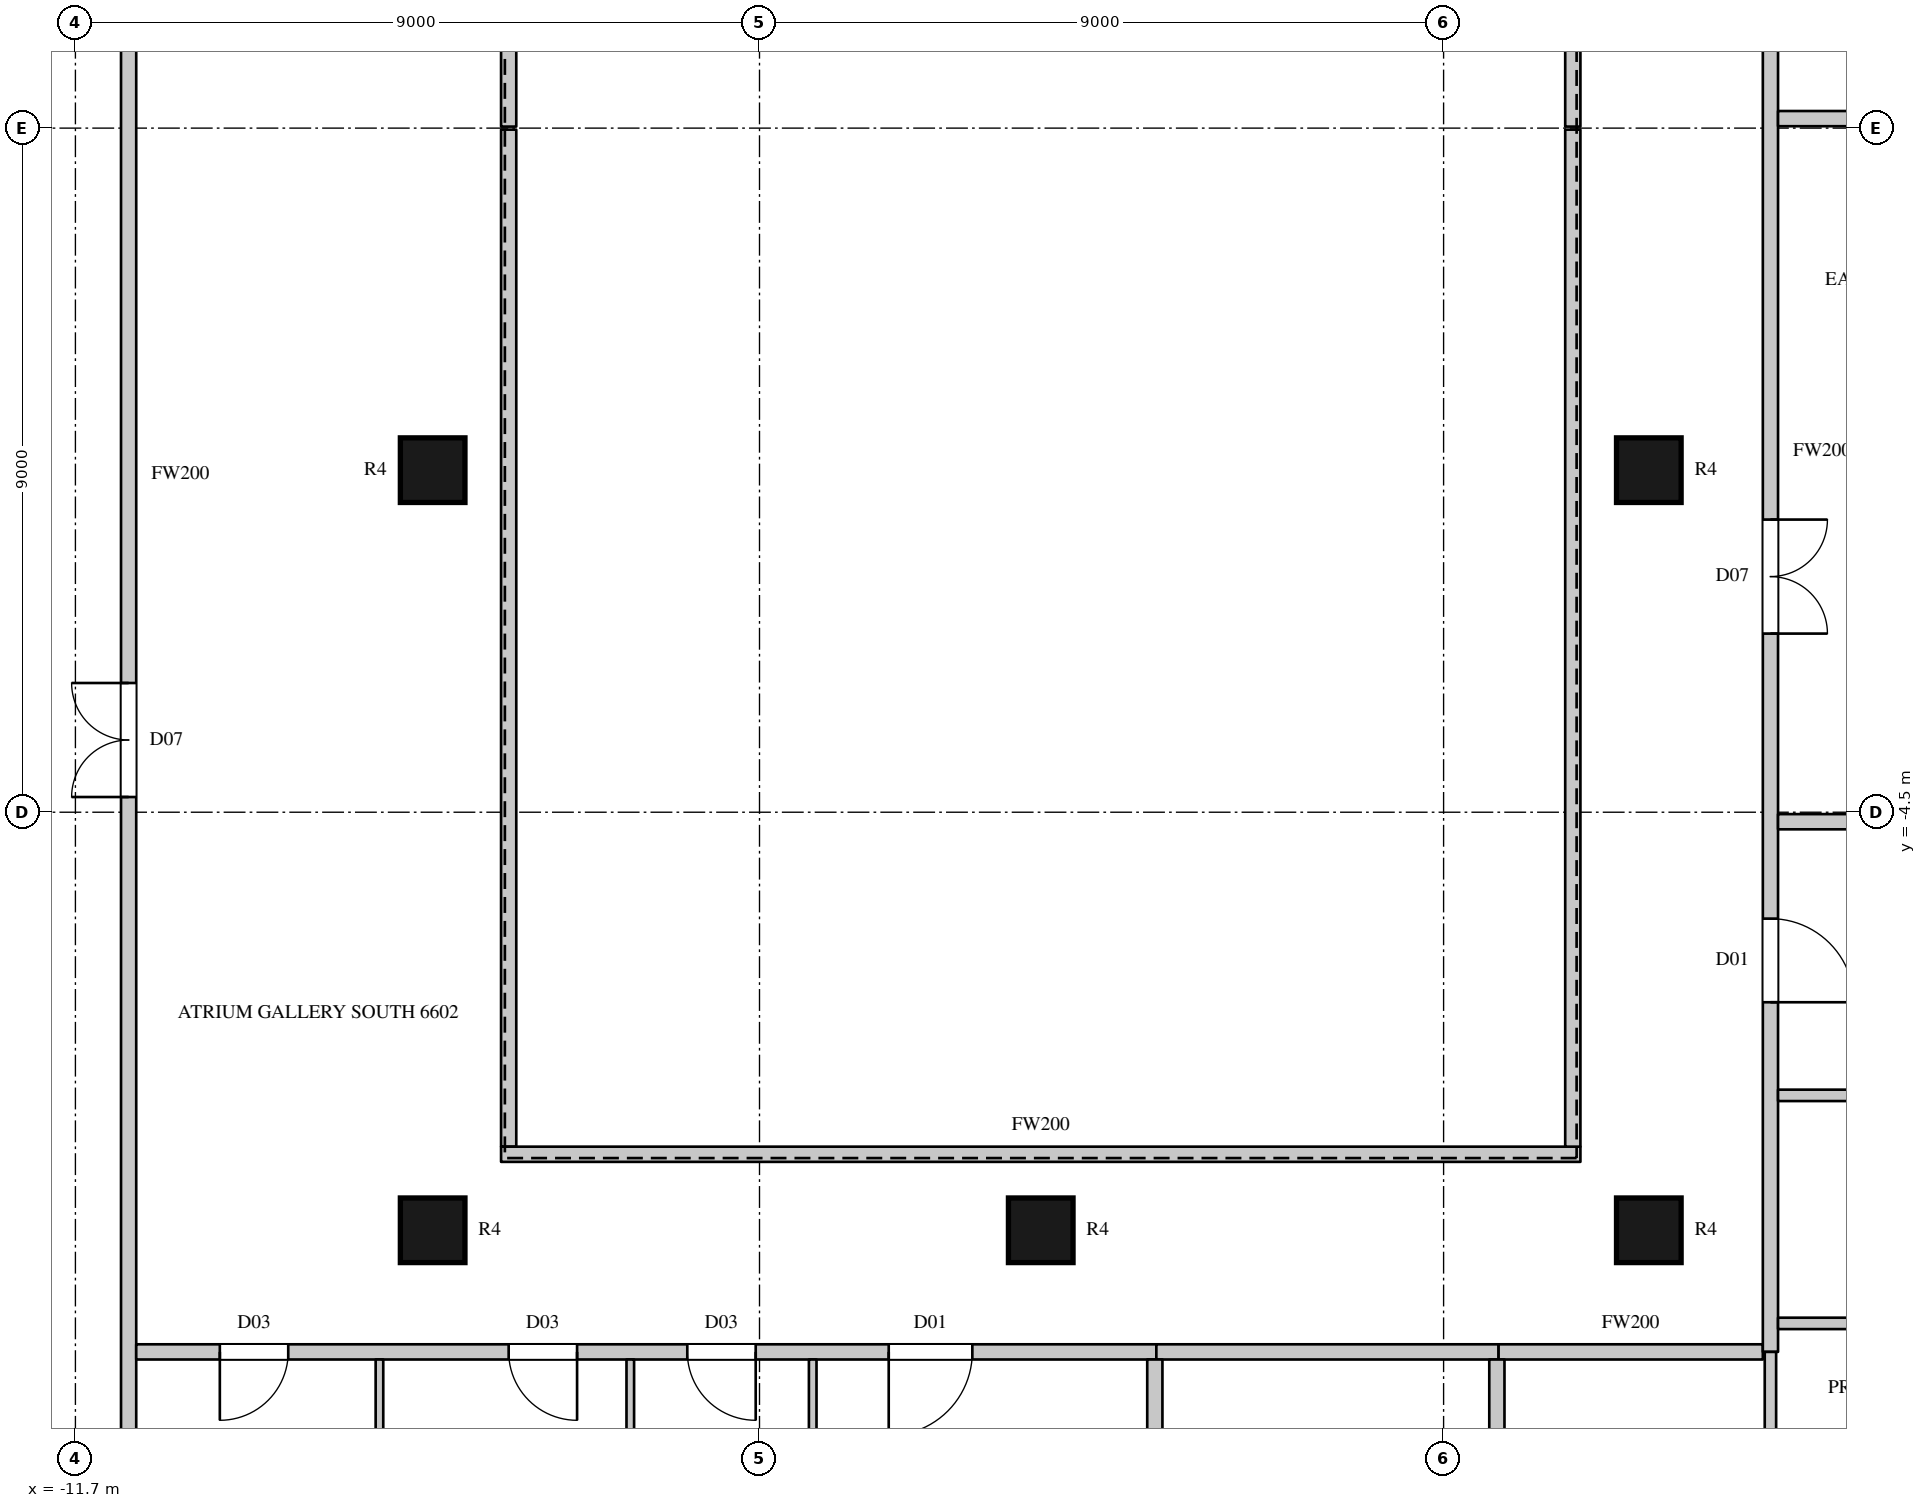
"""IFC4 building model, lengths in metres.
Left out: names, types, materials, properties, quantities, classifications, styles, units other than length and angle.
Written with IfcOpenShell. Run it as: python <this file> out.ifc"""

import sys

from ifc_helpers import new_model, si_unit, direction, frame, frame_2d, origin, origin_2d, place, context, subcontext, project, spatial, rectangle, circle, extrude, element, fill, save


model = new_model("IFC4")
c1 = context("Model", 3, precision=1e-05, world=origin(), true_north=direction((0.0, 1.0)))
c2 = subcontext(c1, "Body", "Model", "MODEL_VIEW")
j1 = project(units=[si_unit("LENGTHUNIT", "METRE"), si_unit("PLANEANGLEUNIT", "RADIAN")], contexts=[c1])
p1 = place(None, origin())
s1 = spatial("IfcSite", under=j1, at=p1, CompositionType="ELEMENT")
p2 = place(p1, origin())
s2 = spatial("IfcBuilding", under=s1, at=p2, CompositionType="ELEMENT")
p3 = place(p2, frame((0.0, 0.0, 292.6)))
s3 = spatial("IfcBuildingStorey", under=s2, at=p3, CompositionType="ELEMENT", Elevation=292.6)
for number, where, z_axis, x_axis in (
    (1, (-7.0, -10.0, 0.0), (0.0, 0.0, 1.0), (1.0, 0.0, 0.0)),
    (2, (-7.0, 0.0, 0.0), (0.0, 0.0, 1.0), (1.0, 0.0, 0.0)),
    (3, (1.0, -10.0, 0.0), (0.0, 0.0, 1.0), (1.0, 0.0, 0.0)),
    (4, (9.0, -10.0, 0.0), (0.0, 0.0, 1.0), (1.0, 0.0, 0.0)),
    (5, (9.0, 0.0, 0.0), (0.0, 0.0, 1.0), (1.0, 0.0, 0.0)),
):
    element("IfcColumn", number, at=place(p3, frame(where, z_axis=z_axis, x_axis=x_axis)), inside=s3, PredefinedType="COLUMN", context=c2, shape_type="SweptSolid", body=[
        extrude(circle(Radius=0.425, at=origin_2d()), origin(), (0.0, 0.0, 1.0), 4.1),
    ])
p4 = place(p3, frame((-11.0, -14.8, 0.0), z_axis=(0.0, 0.0, 1.0), x_axis=(0.0, 1.0, 0.0)))
e6 = element("IfcWall", 6, at=p4, inside=s3, PredefinedType="PARTITIONING", context=c2, shape_type="SweptSolid", body=[
    extrude(rectangle(XDim=29.5, YDim=0.2, at=frame_2d((14.75, 0.0))), origin(), (0.0, 0.0, 1.0), 3.8),
])
p5 = place(p4, frame((10.5, 0.0, 0.0)))
e7 = element("IfcOpeningElement", 7, at=p5, cuts=e6, PredefinedType="OPENING", context=c2, shape_type="SweptSolid", body=[
    extrude(rectangle(XDim=1.5, YDim=2.4, at=frame_2d((0.75, 1.2))), frame((0.0, 0.11, 0.0), z_axis=(0.0, -1.0, 0.0), x_axis=(1.0, 0.0, 0.0)), (0.0, 0.0, 1.0), 0.22),
])
p6 = place(p3, frame((-10.9, -11.6, 0.0), z_axis=(0.0, 0.0, 1.0), x_axis=(1.0, 0.0, 0.0)))
e8 = element("IfcWall", 8, at=p6, inside=s3, PredefinedType="PARTITIONING", context=c2, shape_type="SweptSolid", body=[
    extrude(rectangle(XDim=13.421, YDim=0.2, at=frame_2d((6.71, 0.0))), origin(), (0.0, 0.0, 1.0), 3.8),
])
p7 = place(p6, frame((1.1, 0.0, 0.0)))
e9 = element("IfcOpeningElement", 9, at=p7, cuts=e8, PredefinedType="OPENING", context=c2, shape_type="SweptSolid", body=[
    extrude(rectangle(XDim=0.9, YDim=2.2, at=frame_2d((0.45, 1.1))), frame((0.0, 0.11, 0.0), z_axis=(0.0, -1.0, 0.0), x_axis=(1.0, 0.0, 0.0)), (0.0, 0.0, 1.0), 0.22),
])
p8 = place(p6, frame((4.9, 0.0, 0.0)))
e10 = element("IfcOpeningElement", 10, at=p8, cuts=e8, PredefinedType="OPENING", context=c2, shape_type="SweptSolid", body=[
    extrude(rectangle(XDim=0.9, YDim=2.2, at=frame_2d((0.45, 1.1))), frame((0.0, 0.11, 0.0), z_axis=(0.0, -1.0, 0.0), x_axis=(1.0, 0.0, 0.0)), (0.0, 0.0, 1.0), 0.22),
])
p9 = place(p6, frame((7.25, 0.0, 0.0)))
e11 = element("IfcOpeningElement", 11, at=p9, cuts=e8, PredefinedType="OPENING", context=c2, shape_type="SweptSolid", body=[
    extrude(rectangle(XDim=0.9, YDim=2.2, at=frame_2d((0.45, 1.1))), frame((0.0, 0.11, 0.0), z_axis=(0.0, -1.0, 0.0), x_axis=(1.0, 0.0, 0.0)), (0.0, 0.0, 1.0), 0.22),
])
p10 = place(p6, frame((9.9, 0.0, 0.0)))
e12 = element("IfcOpeningElement", 12, at=p10, cuts=e8, PredefinedType="OPENING", context=c2, shape_type="SweptSolid", body=[
    extrude(rectangle(XDim=1.1, YDim=2.4, at=frame_2d((0.55, 1.2))), frame((0.0, 0.11, 0.0), z_axis=(0.0, -1.0, 0.0), x_axis=(1.0, 0.0, 0.0)), (0.0, 0.0, 1.0), 0.22),
])
p11 = place(p3, frame((-6.0, -8.9, 0.0), z_axis=(0.0, 0.0, 1.0), x_axis=(0.0, 1.0, 0.0)))
e13 = element("IfcWall", 13, at=p11, inside=s3, PredefinedType="PARTITIONING", context=c2, shape_type="SweptSolid", body=[
    extrude(rectangle(XDim=13.38, YDim=0.2, at=frame_2d((6.69, 0.0))), origin(), (0.0, 0.0, 1.0), 3.8),
])
p12 = place(p3, frame((-6.1, -9.0, 0.0), z_axis=(0.0, 0.0, 1.0), x_axis=(1.0, 0.0, 0.0)))
e14 = element("IfcWall", 14, at=p12, inside=s3, PredefinedType="PARTITIONING", context=c2, shape_type="SweptSolid", body=[
    extrude(rectangle(XDim=14.2, YDim=0.2, at=frame_2d((7.1, 0.0))), origin(), (0.0, 0.0, 1.0), 3.8),
])
p13 = place(p3, frame((-6.0, 4.52, 0.0), z_axis=(0.0, 0.0, 1.0), x_axis=(0.0, 1.0, 0.0)))
e15 = element("IfcWall", 15, at=p13, inside=s3, PredefinedType="PARTITIONING", context=c2, shape_type="SweptSolid", body=[
    extrude(rectangle(XDim=4.38, YDim=0.2, at=frame_2d((2.19, 0.0))), origin(), (0.0, 0.0, 1.0), 3.8),
])
p14 = place(p3, frame((7.021, -11.6, 0.0), z_axis=(0.0, 0.0, 1.0), x_axis=(1.0, 0.0, 0.0)))
e16 = element("IfcWall", 16, at=p14, inside=s3, PredefinedType="PARTITIONING", context=c2, shape_type="SweptSolid", body=[
    extrude(rectangle(XDim=3.479, YDim=0.2, at=frame_2d((1.74, 0.0))), origin(), (0.0, 0.0, 1.0), 3.8),
])
p15 = place(p3, frame((8.0, -8.9, 0.0), z_axis=(0.0, 0.0, 1.0), x_axis=(0.0, 1.0, 0.0)))
e17 = element("IfcWall", 17, at=p15, inside=s3, PredefinedType="PARTITIONING", context=c2, shape_type="SweptSolid", body=[
    extrude(rectangle(XDim=13.38, YDim=0.2, at=frame_2d((6.69, 0.0))), origin(), (0.0, 0.0, 1.0), 3.8),
])
p16 = place(p3, frame((8.0, 4.52, 0.0), z_axis=(0.0, 0.0, 1.0), x_axis=(0.0, 1.0, 0.0)))
e18 = element("IfcWall", 18, at=p16, inside=s3, PredefinedType="PARTITIONING", context=c2, shape_type="SweptSolid", body=[
    extrude(rectangle(XDim=4.38, YDim=0.2, at=frame_2d((2.19, 0.0))), origin(), (0.0, 0.0, 1.0), 3.8),
])
p17 = place(p3, frame((10.6, -11.6, 0.0), z_axis=(0.0, 0.0, 1.0), x_axis=(0.0, 1.0, 0.0)))
e19 = element("IfcWall", 19, at=p17, inside=s3, PredefinedType="PARTITIONING", context=c2, shape_type="SweptSolid", body=[
    extrude(rectangle(XDim=23.7, YDim=0.2, at=frame_2d((11.85, 0.0))), origin(), (0.0, 0.0, 1.0), 3.8),
])
p18 = place(p17, frame((9.45, 0.0, 0.0)))
e20 = element("IfcOpeningElement", 20, at=p18, cuts=e19, PredefinedType="OPENING", context=c2, shape_type="SweptSolid", body=[
    extrude(rectangle(XDim=1.5, YDim=2.4, at=frame_2d((0.75, 1.2))), frame((0.0, 0.11, 0.0), z_axis=(0.0, -1.0, 0.0), x_axis=(1.0, 0.0, 0.0)), (0.0, 0.0, 1.0), 0.22),
])
p19 = place(p17, frame((19.45, 0.0, 0.0)))
e21 = element("IfcOpeningElement", 21, at=p19, cuts=e19, PredefinedType="OPENING", context=c2, shape_type="SweptSolid", body=[
    extrude(rectangle(XDim=1.1, YDim=2.4, at=frame_2d((0.55, 1.2))), frame((0.0, 0.11, 0.0), z_axis=(0.0, -1.0, 0.0), x_axis=(1.0, 0.0, 0.0)), (0.0, 0.0, 1.0), 0.22),
])
p20 = place(p17, frame((4.6, 0.0, 0.0)))
e22 = element("IfcOpeningElement", 22, at=p20, cuts=e19, PredefinedType="OPENING", context=c2, shape_type="SweptSolid", body=[
    extrude(rectangle(XDim=1.1, YDim=2.4, at=frame_2d((0.55, 1.2))), frame((0.0, 0.11, 0.0), z_axis=(0.0, -1.0, 0.0), x_axis=(1.0, 0.0, 0.0)), (0.0, 0.0, 1.0), 0.22),
])
for number, where, z_axis, x_axis in (
    (23, (10.7, -4.625, 0.0), (0.0, 0.0, 1.0), (1.0, 0.0, 0.0)),
    (24, (10.7, 4.625, 0.0), (0.0, 0.0, 1.0), (1.0, 0.0, 0.0)),
):
    element("IfcWall", number, at=place(p3, frame(where, z_axis=z_axis, x_axis=x_axis)), inside=s3, PredefinedType="PARTITIONING", context=c2, shape_type="SweptSolid", body=[
        extrude(rectangle(XDim=3.975, YDim=0.2, at=frame_2d((1.988, 0.0))), origin(), (0.0, 0.0, 1.0), 3.8),
    ])
p21 = place(p3, frame((10.6, -20.864, 0.0), z_axis=(0.0, 0.0, 1.0), x_axis=(0.0, 1.0, 0.0)))
e25 = element("IfcWall", 25, at=p21, inside=s3, PredefinedType="PARTITIONING", context=c2, shape_type="SweptSolid", body=[
    extrude(rectangle(XDim=9.264, YDim=0.15, at=frame_2d((4.632, 0.0))), origin(), (0.0, 0.0, 1.0), 3.8),
])
p22 = place(p3, frame((10.7, -11.225, 0.0), z_axis=(0.0, 0.0, 1.0), x_axis=(1.0, 0.0, 0.0)))
e26 = element("IfcWall", 26, at=p22, inside=s3, PredefinedType="PARTITIONING", context=c2, shape_type="SweptSolid", body=[
    extrude(rectangle(XDim=3.425, YDim=0.15, at=frame_2d((1.712, 0.0))), origin(), (0.0, 0.0, 1.0), 3.8),
])
p23 = place(p3, frame((10.7, -8.225, 0.0), z_axis=(0.0, 0.0, 1.0), x_axis=(1.0, 0.0, 0.0)))
e27 = element("IfcWall", 27, at=p23, inside=s3, PredefinedType="PARTITIONING", context=c2, shape_type="SweptSolid", body=[
    extrude(rectangle(XDim=3.575, YDim=0.15, at=frame_2d((1.788, 0.0))), origin(), (0.0, 0.0, 1.0), 3.15),
])
p24 = place(p23, frame((1.25, 0.0, 0.0)))
e28 = element("IfcOpeningElement", 28, at=p24, cuts=e27, PredefinedType="OPENING", context=c2, shape_type="SweptSolid", body=[
    extrude(rectangle(XDim=0.95, YDim=2.2, at=frame_2d((0.475, 1.1))), frame((0.0, 0.085, 0.0), z_axis=(0.0, -1.0, 0.0), x_axis=(1.0, 0.0, 0.0)), (0.0, 0.0, 1.0), 0.17),
])
p25 = place(p3, frame((2.521, -11.6, 0.0), z_axis=(0.0, 0.0, 1.0), x_axis=(1.0, 0.0, 0.0)))
e29 = element("IfcWall", 29, at=p25, inside=s3, PredefinedType="PARTITIONING", context=c2, shape_type="SweptSolid", body=[
    extrude(rectangle(XDim=4.5, YDim=0.2, at=frame_2d((2.25, 0.0))), origin(), (0.0, 0.0, 1.0), 3.8),
])
p26 = place(p3, frame((2.501, -15.7, 0.0), z_axis=(0.0, 0.0, 1.0), x_axis=(0.0, 1.0, 0.0)))
e30 = element("IfcWall", 30, at=p26, inside=s3, PredefinedType="PARTITIONING", context=c2, shape_type="SweptSolid", body=[
    extrude(rectangle(XDim=4.0, YDim=0.2, at=frame_2d((2.0, 0.0))), origin(), (0.0, 0.0, 1.0), 3.8),
])
p27 = place(p26, frame((0.15, 0.0, 0.0)))
e31 = element("IfcOpeningElement", 31, at=p27, cuts=e30, PredefinedType="OPENING", context=c2, shape_type="SweptSolid", body=[
    extrude(rectangle(XDim=0.9, YDim=2.2, at=frame_2d((0.45, 1.1))), frame((0.0, 0.11, 0.0), z_axis=(0.0, -1.0, 0.0), x_axis=(1.0, 0.0, 0.0)), (0.0, 0.0, 1.0), 0.22),
])
p28 = place(p3, frame((7.001, -15.7, 0.0), z_axis=(0.0, 0.0, 1.0), x_axis=(0.0, 1.0, 0.0)))
e32 = element("IfcWall", 32, at=p28, inside=s3, PredefinedType="PARTITIONING", context=c2, shape_type="SweptSolid", body=[
    extrude(rectangle(XDim=4.0, YDim=0.2, at=frame_2d((2.0, 0.0))), origin(), (0.0, 0.0, 1.0), 3.8),
])
for number, where, z_axis, x_axis in (
    (33, (-7.7, -24.04, 0.0), (0.0, 0.0, 1.0), (0.0, 1.0, 0.0)),
    (34, (-4.4, -24.04, 0.0), (0.0, 0.0, 1.0), (0.0, 1.0, 0.0)),
):
    element("IfcWall", number, at=place(p3, frame(where, z_axis=z_axis, x_axis=x_axis)), inside=s3, PredefinedType="PARTITIONING", context=c2, shape_type="SweptSolid", body=[
        extrude(rectangle(XDim=12.34, YDim=0.1, at=frame_2d((6.17, 0.0))), origin(), (0.0, 0.0, 1.0), 3.8),
    ])
p29 = place(p3, frame((-2.0, -23.447, 0.0), z_axis=(0.0, 0.0, 1.0), x_axis=(0.0, 1.0, 0.0)))
e35 = element("IfcWall", 35, at=p29, inside=s3, PredefinedType="PARTITIONING", context=c2, shape_type="SweptSolid", body=[
    extrude(rectangle(XDim=11.747, YDim=0.1, at=frame_2d((5.874, 0.0))), origin(), (0.0, 0.0, 1.0), 3.8),
])
p30 = place(p5, origin())
e36 = element("IfcDoor", 36, at=p30, inside=s3, OperationType="DOUBLE_DOOR_SINGLE_SWING", PredefinedType="DOOR", context=c2, shape_type="SweptSolid", body=[
    extrude(rectangle(XDim=1.5, YDim=2.4, at=frame_2d((0.75, 1.2))), frame((0.0, 0.025, 0.0), z_axis=(0.0, -1.0, 0.0), x_axis=(1.0, 0.0, 0.0)), (0.0, 0.0, 1.0), 0.05),
])
fill(e7, e36)
p31 = place(p18, origin())
e37 = element("IfcDoor", 37, at=p31, inside=s3, OperationType="DOUBLE_DOOR_SINGLE_SWING", PredefinedType="DOOR", context=c2, shape_type="SweptSolid", body=[
    extrude(rectangle(XDim=1.5, YDim=2.4, at=frame_2d((0.75, 1.2))), frame((0.0, 0.025, 0.0), z_axis=(0.0, -1.0, 0.0), x_axis=(1.0, 0.0, 0.0)), (0.0, 0.0, 1.0), 0.05),
])
fill(e20, e37)
p32 = place(p7, origin())
e38 = element("IfcDoor", 38, at=p32, inside=s3, OperationType="SINGLE_SWING_RIGHT", PredefinedType="DOOR", context=c2, shape_type="SweptSolid", body=[
    extrude(rectangle(XDim=0.9, YDim=2.2, at=frame_2d((0.45, 1.1))), frame((0.0, 0.025, 0.0), z_axis=(0.0, -1.0, 0.0), x_axis=(1.0, 0.0, 0.0)), (0.0, 0.0, 1.0), 0.05),
])
fill(e9, e38)
p33 = place(p8, origin())
e39 = element("IfcDoor", 39, at=p33, inside=s3, OperationType="SINGLE_SWING_LEFT", PredefinedType="DOOR", context=c2, shape_type="SweptSolid", body=[
    extrude(rectangle(XDim=0.9, YDim=2.2, at=frame_2d((0.45, 1.1))), frame((0.0, 0.025, 0.0), z_axis=(0.0, -1.0, 0.0), x_axis=(1.0, 0.0, 0.0)), (0.0, 0.0, 1.0), 0.05),
])
fill(e10, e39)
p34 = place(p9, origin())
e40 = element("IfcDoor", 40, at=p34, inside=s3, OperationType="SINGLE_SWING_LEFT", PredefinedType="DOOR", context=c2, shape_type="SweptSolid", body=[
    extrude(rectangle(XDim=0.9, YDim=2.2, at=frame_2d((0.45, 1.1))), frame((0.0, 0.025, 0.0), z_axis=(0.0, -1.0, 0.0), x_axis=(1.0, 0.0, 0.0)), (0.0, 0.0, 1.0), 0.05),
])
fill(e11, e40)
p35 = place(p10, origin())
e41 = element("IfcDoor", 41, at=p35, inside=s3, OperationType="SINGLE_SWING_RIGHT", PredefinedType="DOOR", context=c2, shape_type="SweptSolid", body=[
    extrude(rectangle(XDim=1.1, YDim=2.4, at=frame_2d((0.55, 1.2))), frame((0.0, 0.025, 0.0), z_axis=(0.0, -1.0, 0.0), x_axis=(1.0, 0.0, 0.0)), (0.0, 0.0, 1.0), 0.05),
])
fill(e12, e41)
p36 = place(p20, origin())
e42 = element("IfcDoor", 42, at=p36, inside=s3, OperationType="SINGLE_SWING_RIGHT", PredefinedType="DOOR", context=c2, shape_type="SweptSolid", body=[
    extrude(rectangle(XDim=1.1, YDim=2.4, at=frame_2d((0.55, 1.2))), frame((0.0, 0.025, 0.0), z_axis=(0.0, -1.0, 0.0), x_axis=(1.0, 0.0, 0.0)), (0.0, 0.0, 1.0), 0.05),
])
fill(e22, e42)
save(model, sys.argv[1])
